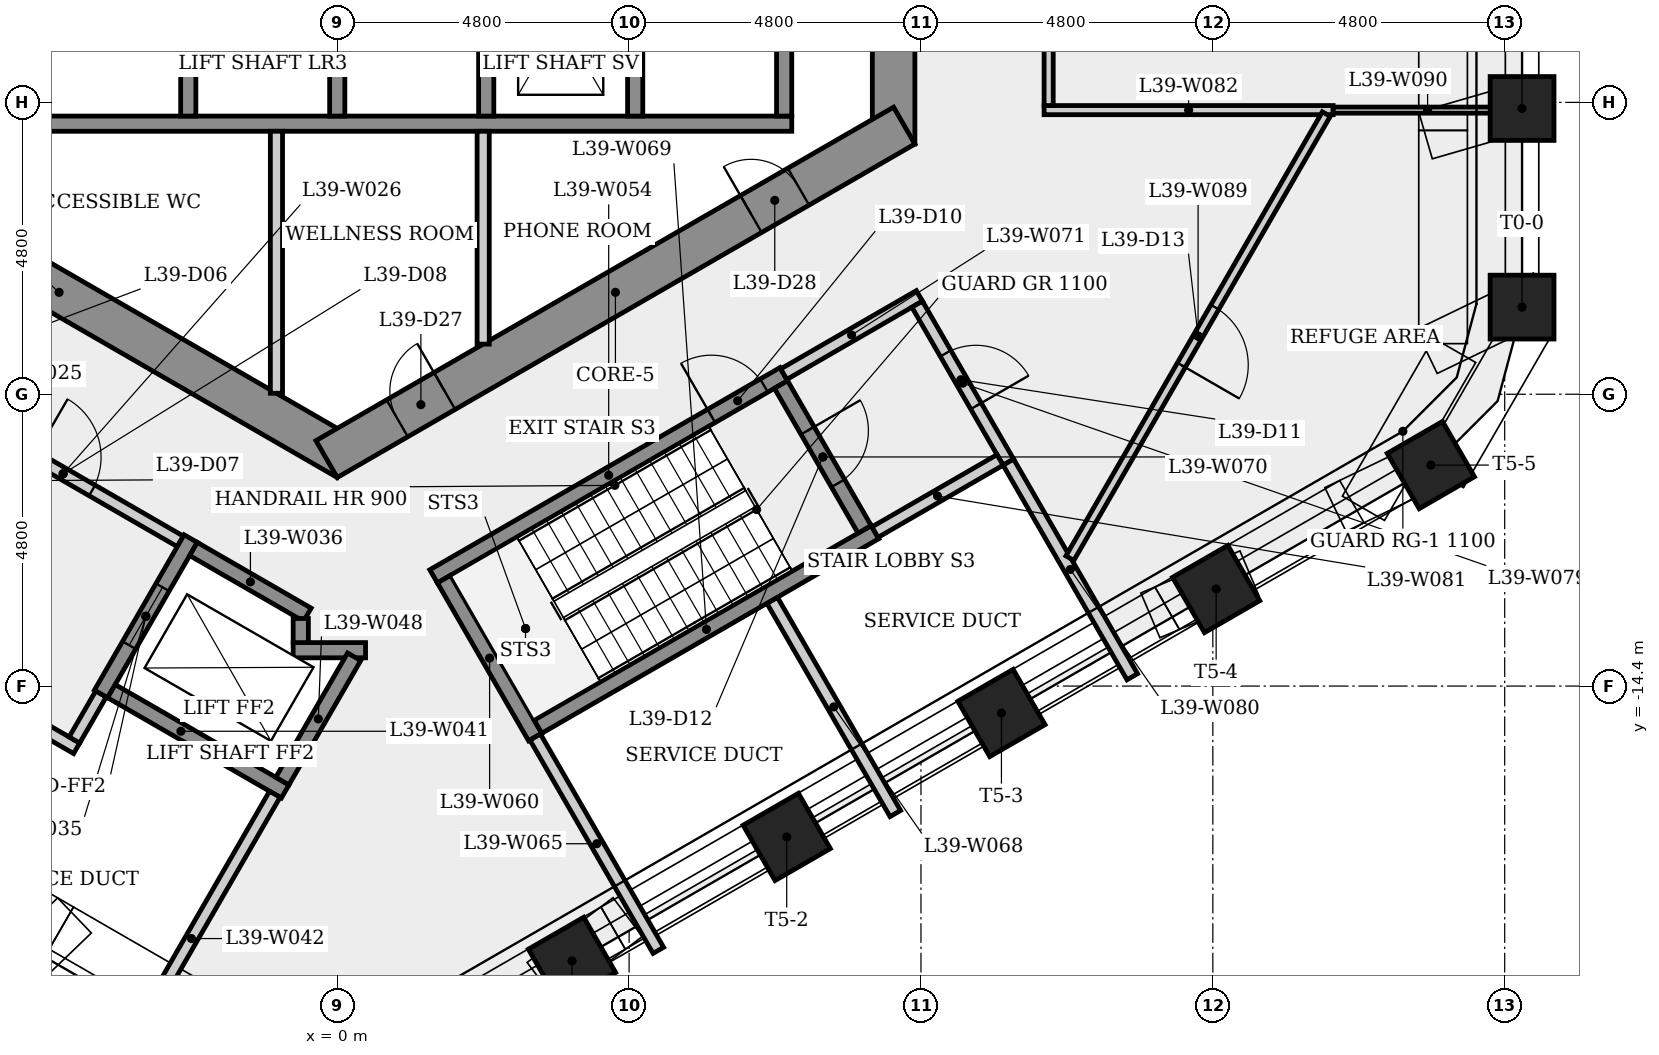
"""IFC4 building model, lengths in metres.
Left out: names, types, materials, properties, quantities, classifications, styles, units other than length and angle.
Written with IfcOpenShell. Run it as: python <this file> out.ifc"""

import sys

from ifc_helpers import new_model, si_unit, direction, frame, frame_2d, origin, origin_2d, place, context, subcontext, project, spatial, rectangle, extrude, element, fill, save


model = new_model("IFC4")
c1 = context("Model", 3, precision=1e-05, world=origin(), true_north=direction((0.0, 1.0)))
c2 = subcontext(c1, "Body", "Model", "MODEL_VIEW")
j1 = project(units=[si_unit("LENGTHUNIT", "METRE"), si_unit("PLANEANGLEUNIT", "RADIAN")], contexts=[c1])
p1 = place(None, origin())
s1 = spatial("IfcSite", under=j1, at=p1, CompositionType="ELEMENT")
p2 = place(p1, origin())
s2 = spatial("IfcBuilding", under=s1, at=p2, CompositionType="ELEMENT")
p3 = place(p2, frame((0.0, 0.0, 147.9)))
s3 = spatial("IfcBuildingStorey", under=s2, at=p3, CompositionType="ELEMENT", Elevation=147.9)
p4 = place(p3, frame((9.15, -5.485, 0.0), z_axis=(0.0, 0.0, 1.0), x_axis=(0.0, 1.0, 0.0)))
e1 = element("IfcWall", 1, at=p4, inside=s3, PredefinedType="SHEAR", context=c2, shape_type="SweptSolid", body=[
    extrude(rectangle(XDim=10.97, YDim=0.7, at=frame_2d((5.485, 0.0))), origin(), (0.0, 0.0, 1.0), 4.8),
])
p5 = place(p4, frame((4.685, 0.0, 0.0)))
e2 = element("IfcOpeningElement", 2, at=p5, cuts=e1, PredefinedType="OPENING", context=c2, shape_type="SweptSolid", body=[
    extrude(rectangle(XDim=1.6, YDim=2.1, at=frame_2d((0.8, 1.05))), frame((0.0, 0.36, 0.0), z_axis=(0.0, -1.0, 0.0), x_axis=(1.0, 0.0, 0.0)), (0.0, 0.0, 1.0), 0.72),
])
p6 = place(p3, frame((-9.325, -5.182, 0.0), z_axis=(0.0, 0.0, 1.0), x_axis=(0.866023993627, -0.500002442456, 0.0)))
e3 = element("IfcWall", 3, at=p6, inside=s3, PredefinedType="SHEAR", context=c2, shape_type="SweptSolid", body=[
    extrude(rectangle(XDim=10.97, YDim=0.7, at=frame_2d((5.485, 0.0))), origin(), (0.0, 0.0, 1.0), 4.8),
])
p7 = place(p6, frame((2.817, 0.0, 0.0)))
e4 = element("IfcOpeningElement", 4, at=p7, cuts=e3, PredefinedType="OPENING", context=c2, shape_type="SweptSolid", body=[
    extrude(rectangle(XDim=0.9, YDim=2.1, at=frame_2d((0.45, 1.05))), frame((0.0, 0.36, 0.0), z_axis=(0.0, -1.0, 0.0), x_axis=(1.0, 0.0, 0.0)), (0.0, 0.0, 1.0), 0.72),
])
p8 = place(p3, frame((-0.175, -10.667, 0.0), z_axis=(0.0, 0.0, 1.0), x_axis=(0.866023993627, 0.500002442456, 0.0)))
e5 = element("IfcWall", 5, at=p8, inside=s3, PredefinedType="SHEAR", context=c2, shape_type="SweptSolid", body=[
    extrude(rectangle(XDim=10.97, YDim=0.7, at=frame_2d((5.485, 0.0))), origin(), (0.0, 0.0, 1.0), 4.8),
])
p9 = place(p8, frame((1.34, 0.0, 0.0)))
e6 = element("IfcOpeningElement", 6, at=p9, cuts=e5, PredefinedType="OPENING", context=c2, shape_type="SweptSolid", body=[
    extrude(rectangle(XDim=0.9, YDim=2.1, at=frame_2d((0.45, 1.05))), frame((0.0, 0.36, 0.0), z_axis=(0.0, -1.0, 0.0), x_axis=(1.0, 0.0, 0.0)), (0.0, 0.0, 1.0), 0.72),
])
p10 = place(p8, frame((8.061, 0.0, 0.0)))
e7 = element("IfcOpeningElement", 7, at=p10, cuts=e5, PredefinedType="OPENING", context=c2, shape_type="SweptSolid", body=[
    extrude(rectangle(XDim=0.9, YDim=2.1, at=frame_2d((0.45, 1.05))), frame((0.0, 0.36, 0.0), z_axis=(0.0, -1.0, 0.0), x_axis=(1.0, 0.0, 0.0)), (0.0, 0.0, 1.0), 0.72),
])
for number, where, z_axis, x_axis in (
    (8, (19.486, -8.167, 0.0), (0.0, 0.0, 1.0), (1.0, 0.0, 0.0)),
    (9, (19.486, -4.9, 0.0), (0.0, 0.0, 1.0), (1.0, 0.0, 0.0)),
    (10, (3.861, -18.92, 0.0), (0.0, 0.0, 1.0), (0.5, -0.866, 0.0)),
    (11, (7.392, -16.881, 0.0), (0.0, 0.0, 1.0), (0.5, -0.866, 0.0)),
    (12, (10.923, -14.843, 0.0), (0.0, 0.0, 1.0), (0.5, -0.866, 0.0)),
    (13, (14.455, -12.804, 0.0), (0.0, 0.0, 1.0), (0.5, -0.866, 0.0)),
    (14, (17.986, -10.765, 0.0), (0.0, 0.0, 1.0), (0.5, -0.866, 0.0)),
):
    element("IfcColumn", number, at=place(p3, frame(where, z_axis=z_axis, x_axis=x_axis)), inside=s3, PredefinedType="COLUMN", context=c2, shape_type="SweptSolid", body=[
        extrude(rectangle(XDim=1.05, YDim=1.05, at=origin_2d()), origin(), (0.0, 0.0, 1.0), 4.45),
    ])
p11 = place(p3, frame((-8.356, -13.073, 0.0), z_axis=(0.0, 0.0, 1.0), x_axis=(0.866038532462, -0.499977259774, 0.0)))
e15 = element("IfcWall", 15, at=p11, inside=s3, PredefinedType="PLUMBINGWALL", context=c2, shape_type="SweptSolid", body=[
    extrude(rectangle(XDim=4.7, YDim=0.2, at=frame_2d((2.35, 0.0))), origin(), (0.0, 0.0, 1.0), 4.45),
])
p12 = place(p3, frame((-6.435, -9.795, 0.0), z_axis=(0.0, 0.0, 1.0), x_axis=(0.866012907634, -0.500021643343, 0.0)))
e16 = element("IfcWall", 16, at=p12, inside=s3, PredefinedType="PARTITIONING", context=c2, shape_type="SweptSolid", body=[
    extrude(rectangle(XDim=4.45, YDim=0.2, at=frame_2d((2.225, 0.0))), origin(), (0.0, 0.0, 1.0), 4.45),
])
p13 = place(p12, frame((1.675, 0.0, 0.0)))
e17 = element("IfcOpeningElement", 17, at=p13, cuts=e16, PredefinedType="OPENING", context=c2, shape_type="SweptSolid", body=[
    extrude(rectangle(XDim=1.1, YDim=2.1, at=frame_2d((0.55, 1.05))), frame((0.0, 0.11, 0.0), z_axis=(0.0, -1.0, 0.0), x_axis=(1.0, 0.0, 0.0)), (0.0, 0.0, 1.0), 0.22),
])
p14 = place(p3, frame((-7.225, -5.15, 0.0), z_axis=(0.0, 0.0, 1.0), x_axis=(1.0, 0.0, 0.0)))
e18 = element("IfcWall", 18, at=p14, inside=s3, PredefinedType="SHEAR", context=c2, shape_type="SweptSolid", body=[
    extrude(rectangle(XDim=14.7, YDim=0.25, at=frame_2d((7.35, 0.0))), origin(), (0.0, 0.0, 1.0), 4.45),
])
p15 = place(p3, frame((-3.885, -14.529, 0.0), z_axis=(0.0, 0.0, 1.0), x_axis=(-0.499859285417, -0.866106630146, 0.0)))
e19 = element("IfcWall", 19, at=p15, inside=s3, PredefinedType="PLUMBINGWALL", context=c2, shape_type="SweptSolid", body=[
    extrude(rectangle(XDim=0.875, YDim=0.2, at=frame_2d((0.438, 0.0))), origin(), (0.0, 0.0, 1.0), 4.45),
])
p16 = place(p3, frame((-2.41, -11.974, 0.0), z_axis=(0.0, 0.0, 1.0), x_axis=(-0.500001826776, -0.866024349092, 0.0)))
e20 = element("IfcWall", 20, at=p16, inside=s3, PredefinedType="SHEAR", context=c2, shape_type="SweptSolid", body=[
    extrude(rectangle(XDim=2.95, YDim=0.25, at=frame_2d((1.475, 0.0))), origin(), (0.0, 0.0, 1.0), 4.45),
])
p17 = place(p16, frame((0.925, 0.0, 0.0)))
e21 = element("IfcOpeningElement", 21, at=p17, cuts=e20, PredefinedType="OPENING", context=c2, shape_type="SweptSolid", body=[
    extrude(rectangle(XDim=1.1, YDim=2.1, at=frame_2d((0.55, 1.05))), frame((0.0, 0.135, 0.0), z_axis=(0.0, -1.0, 0.0), x_axis=(1.0, 0.0, 0.0)), (0.0, 0.0, 1.0), 0.27),
])
p18 = place(p3, frame((-2.364, -12.145, 0.0), z_axis=(0.0, 0.0, 1.0), x_axis=(0.86603892542, -0.499976579108, 0.0)))
e22 = element("IfcWall", 22, at=p18, inside=s3, PredefinedType="SHEAR", context=c2, shape_type="SweptSolid", body=[
    extrude(rectangle(XDim=2.162, YDim=0.25, at=frame_2d((1.081, 0.0))), origin(), (0.0, 0.0, 1.0), 4.8),
])
p19 = place(p3, frame((-2.45, -1.925, 0.0), z_axis=(0.0, 0.0, 1.0), x_axis=(0.0, -1.0, 0.0)))
e23 = element("IfcWall", 23, at=p19, inside=s3, PredefinedType="SHEAR", context=c2, shape_type="SweptSolid", body=[
    extrude(rectangle(XDim=3.1, YDim=0.25, at=frame_2d((1.55, 0.0))), origin(), (0.0, 0.0, 1.0), 4.45),
])
p20 = place(p3, frame((-1.0, -5.275, 0.0), z_axis=(0.0, 0.0, 1.0), x_axis=(0.0, -1.0, 0.0)))
e24 = element("IfcWall", 24, at=p20, inside=s3, PredefinedType="PARTITIONING", context=c2, shape_type="SweptSolid", body=[
    extrude(rectangle(XDim=4.309, YDim=0.2, at=frame_2d((2.155, 0.0))), origin(), (0.0, 0.0, 1.0), 4.45),
])
p21 = place(p3, frame((-0.856, -16.133, 0.0), z_axis=(0.0, 0.0, 1.0), x_axis=(-0.866021716278, 0.500006386895, 0.0)))
e25 = element("IfcWall", 25, at=p21, inside=s3, PredefinedType="SHEAR", context=c2, shape_type="SweptSolid", body=[
    extrude(rectangle(XDim=3.3, YDim=0.25, at=frame_2d((1.65, 0.0))), origin(), (0.0, 0.0, 1.0), 4.45),
])
p22 = place(p3, frame((-1.027, -16.179, 0.0), z_axis=(0.0, 0.0, 1.0), x_axis=(-0.499980760091, -0.866036511666, 0.0)))
e26 = element("IfcWall", 26, at=p22, inside=s3, PredefinedType="PLUMBINGWALL", context=c2, shape_type="SweptSolid", body=[
    extrude(rectangle(XDim=5.482, YDim=0.2, at=frame_2d((2.741, 0.0))), origin(), (0.0, 0.0, 1.0), 4.45),
])
p23 = place(p3, frame((-0.725, -13.81, 0.0), z_axis=(0.0, 0.0, 1.0), x_axis=(1.0, 0.0, 0.0)))
e27 = element("IfcWall", 27, at=p23, inside=s3, PredefinedType="SHEAR", context=c2, shape_type="SweptSolid", body=[
    extrude(rectangle(XDim=1.191, YDim=0.25, at=frame_2d((0.595, 0.0))), origin(), (0.0, 0.0, 1.0), 4.45),
])
p24 = place(p3, frame((-0.6, -13.289, 0.0), z_axis=(0.0, 0.0, 1.0), x_axis=(0.0, -1.0, 0.0)))
e28 = element("IfcWall", 28, at=p24, inside=s3, PredefinedType="SHEAR", context=c2, shape_type="SweptSolid", body=[
    extrude(rectangle(XDim=0.396, YDim=0.25, at=frame_2d((0.198, 0.0))), origin(), (0.0, 0.0, 1.0), 4.8),
])
p25 = place(p3, frame((0.0, -1.925, 0.0), z_axis=(0.0, 0.0, 1.0), x_axis=(0.0, -1.0, 0.0)))
e29 = element("IfcWall", 29, at=p25, inside=s3, PredefinedType="SHEAR", context=c2, shape_type="SweptSolid", body=[
    extrude(rectangle(XDim=3.1, YDim=0.25, at=frame_2d((1.55, 0.0))), origin(), (0.0, 0.0, 1.0), 4.45),
])
p26 = place(p3, frame((0.278, -13.918, 0.0), z_axis=(0.0, 0.0, 1.0), x_axis=(-0.49998806882, -0.866032292145, 0.0)))
e30 = element("IfcWall", 30, at=p26, inside=s3, PredefinedType="SHEAR", context=c2, shape_type="SweptSolid", body=[
    extrude(rectangle(XDim=2.36, YDim=0.25, at=frame_2d((1.18, 0.0))), origin(), (0.0, 0.0, 1.0), 4.8),
])
p27 = place(p3, frame((1.585, -12.595, 0.0), z_axis=(0.0, 0.0, 1.0), x_axis=(0.866036417653, 0.499980922934, 0.0)))
e31 = element("IfcWall", 31, at=p27, inside=s3, PredefinedType="SHEAR", context=c2, shape_type="SweptSolid", body=[
    extrude(rectangle(XDim=6.65, YDim=0.25, at=frame_2d((3.325, 0.0))), origin(), (0.0, 0.0, 1.0), 4.45),
])
p28 = place(p27, frame((5.275, 0.0, 0.0)))
e32 = element("IfcOpeningElement", 32, at=p28, cuts=e31, PredefinedType="OPENING", context=c2, shape_type="SweptSolid", body=[
    extrude(rectangle(XDim=1.0, YDim=2.1, at=frame_2d((0.5, 1.05))), frame((0.0, 0.135, 0.0), z_axis=(0.0, -1.0, 0.0), x_axis=(1.0, 0.0, 0.0)), (0.0, 0.0, 1.0), 0.27),
])
p29 = place(p3, frame((2.4, -5.275, 0.0), z_axis=(0.0, 0.0, 1.0), x_axis=(0.0, -1.0, 0.0)))
e33 = element("IfcWall", 33, at=p29, inside=s3, PredefinedType="PARTITIONING", context=c2, shape_type="SweptSolid", body=[
    extrude(rectangle(XDim=3.501, YDim=0.2, at=frame_2d((1.75, 0.0))), origin(), (0.0, 0.0, 1.0), 4.45),
])
p30 = place(p3, frame((2.45, -1.925, 0.0), z_axis=(0.0, 0.0, 1.0), x_axis=(0.0, -1.0, 0.0)))
e34 = element("IfcWall", 34, at=p30, inside=s3, PredefinedType="SHEAR", context=c2, shape_type="SweptSolid", body=[
    extrude(rectangle(XDim=3.1, YDim=0.25, at=frame_2d((1.55, 0.0))), origin(), (0.0, 0.0, 1.0), 4.8),
])
p31 = place(p3, frame((3.256, -15.239, 0.0), z_axis=(0.0, 0.0, 1.0), x_axis=(-0.50002537861, 0.866010750942, 0.0)))
e35 = element("IfcWall", 35, at=p31, inside=s3, PredefinedType="SHEAR", context=c2, shape_type="SweptSolid", body=[
    extrude(rectangle(XDim=3.0, YDim=0.25, at=frame_2d((1.5, 0.0))), origin(), (0.0, 0.0, 1.0), 4.45),
])
p32 = place(p3, frame((4.9, -1.925, 0.0), z_axis=(0.0, 0.0, 1.0), x_axis=(0.0, -1.0, 0.0)))
e36 = element("IfcWall", 36, at=p32, inside=s3, PredefinedType="SHEAR", context=c2, shape_type="SweptSolid", body=[
    extrude(rectangle(XDim=3.1, YDim=0.25, at=frame_2d((1.55, 0.0))), origin(), (0.0, 0.0, 1.0), 4.8),
])
for number, where, z_axis, x_axis in (
    (37, (5.281, -18.747, 0.0), (0.0, 0.0, 1.0), (-0.5, 0.866, 0.0)),
    (38, (7.153, -12.989, 0.0), (0.0, 0.0, 1.0), (0.5, -0.866, 0.0)),
):
    element("IfcWall", number, at=place(p3, frame(where, z_axis=z_axis, x_axis=x_axis)), inside=s3, PredefinedType="PLUMBINGWALL", context=c2, shape_type="SweptSolid", body=[
        extrude(rectangle(XDim=4.051, YDim=0.2, at=frame_2d((2.025, 0.0))), origin(), (0.0, 0.0, 1.0), 4.45),
    ])
p33 = place(p3, frame((3.301, -15.068, 0.0), z_axis=(0.0, 0.0, 1.0), x_axis=(0.866035036182, 0.499983315828, 0.0)))
e39 = element("IfcWall", 39, at=p33, inside=s3, PredefinedType="SHEAR", context=c2, shape_type="SweptSolid", body=[
    extrude(rectangle(XDim=6.4, YDim=0.25, at=frame_2d((3.2, 0.0))), origin(), (0.0, 0.0, 1.0), 4.45),
])
p34 = place(p3, frame((7.298, -9.441, 0.0), z_axis=(0.0, 0.0, 1.0), x_axis=(0.500034990121, -0.866005201286, 0.0)))
e40 = element("IfcWall", 40, at=p34, inside=s3, PredefinedType="SHEAR", context=c2, shape_type="SweptSolid", body=[
    extrude(rectangle(XDim=2.75, YDim=0.25, at=frame_2d((1.375, 0.0))), origin(), (0.0, 0.0, 1.0), 4.45),
])
p35 = place(p34, frame((0.875, 0.0, 0.0)))
e41 = element("IfcOpeningElement", 41, at=p35, cuts=e40, PredefinedType="OPENING", context=c2, shape_type="SweptSolid", body=[
    extrude(rectangle(XDim=1.0, YDim=2.1, at=frame_2d((0.5, 1.05))), frame((0.0, 0.135, 0.0), z_axis=(0.0, -1.0, 0.0), x_axis=(1.0, 0.0, 0.0)), (0.0, 0.0, 1.0), 0.27),
])
p36 = place(p3, frame((7.344, -9.27, 0.0), z_axis=(0.0, 0.0, 1.0), x_axis=(0.866005588531, 0.500034319456, 0.0)))
e42 = element("IfcWall", 42, at=p36, inside=s3, PredefinedType="PARTITIONING", context=c2, shape_type="SweptSolid", body=[
    extrude(rectangle(XDim=2.575, YDim=0.2, at=frame_2d((1.288, 0.0))), origin(), (0.0, 0.0, 1.0), 4.45),
])
p37 = place(p3, frame((7.35, -1.925, 0.0), z_axis=(0.0, 0.0, 1.0), x_axis=(0.0, -1.0, 0.0)))
e43 = element("IfcWall", 43, at=p37, inside=s3, PredefinedType="SHEAR", context=c2, shape_type="SweptSolid", body=[
    extrude(rectangle(XDim=3.1, YDim=0.25, at=frame_2d((1.55, 0.0))), origin(), (0.0, 0.0, 1.0), 4.8),
])
p38 = place(p3, frame((9.537, -8.119, 0.0), z_axis=(0.0, 0.0, 1.0), x_axis=(0.499990139034, -0.866031096941, 0.0)))
e44 = element("IfcWall", 44, at=p38, inside=s3, PredefinedType="PARTITIONING", context=c2, shape_type="SweptSolid", body=[
    extrude(rectangle(XDim=3.0, YDim=0.2, at=frame_2d((1.5, 0.0))), origin(), (0.0, 0.0, 1.0), 4.45),
])
p39 = place(p38, frame((0.935, 0.0, 0.0)))
e45 = element("IfcOpeningElement", 45, at=p39, cuts=e44, PredefinedType="OPENING", context=c2, shape_type="SweptSolid", body=[
    extrude(rectangle(XDim=1.0, YDim=2.1, at=frame_2d((0.5, 1.05))), frame((0.0, 0.11, 0.0), z_axis=(0.0, -1.0, 0.0), x_axis=(1.0, 0.0, 0.0)), (0.0, 0.0, 1.0), 0.22),
])
p40 = place(p3, frame((11.037, -10.717, 0.0), z_axis=(0.0, 0.0, 1.0), x_axis=(0.499992114976, -0.866029956157, 0.0)))
e46 = element("IfcWall", 46, at=p40, inside=s3, PredefinedType="PLUMBINGWALL", context=c2, shape_type="SweptSolid", body=[
    extrude(rectangle(XDim=4.075, YDim=0.2, at=frame_2d((2.038, 0.0))), origin(), (0.0, 0.0, 1.0), 4.45),
])
p41 = place(p3, frame((10.901, -10.681, 0.0), z_axis=(0.0, 0.0, 1.0), x_axis=(-0.866007538022, -0.500030943131, 0.0)))
e47 = element("IfcWall", 47, at=p41, inside=s3, PredefinedType="PLUMBINGWALL", context=c2, shape_type="SweptSolid", body=[
    extrude(rectangle(XDim=2.375, YDim=0.2, at=frame_2d((1.188, 0.0))), origin(), (0.0, 0.0, 1.0), 4.45),
])
p42 = place(p3, frame((11.625, -4.927, 0.0), z_axis=(0.0, 0.0, 1.0), x_axis=(1.0, 0.0, 0.0)))
e48 = element("IfcWall", 48, at=p42, inside=s3, PredefinedType="PARTITIONING", context=c2, shape_type="SweptSolid", body=[
    extrude(rectangle(XDim=4.754, YDim=0.15, at=frame_2d((2.377, 0.0))), origin(), (0.0, 0.0, 1.0), 4.45),
])
p43 = place(p3, frame((11.7, -4.852, 0.0), z_axis=(0.0, 0.0, 1.0), x_axis=(0.0, 1.0, 0.0)))
e49 = element("IfcWall", 49, at=p43, inside=s3, PredefinedType="PARTITIONING", context=c2, shape_type="SweptSolid", body=[
    extrude(rectangle(XDim=9.854, YDim=0.15, at=frame_2d((4.927, 0.0))), origin(), (0.0, 0.0, 1.0), 4.45),
])
p44 = place(p43, frame((2.732, 0.0, 0.0)))
e50 = element("IfcOpeningElement", 50, at=p44, cuts=e49, PredefinedType="OPENING", context=c2, shape_type="SweptSolid", body=[
    extrude(rectangle(XDim=1.0, YDim=2.1, at=frame_2d((0.5, 1.05))), frame((0.0, 0.085, 0.0), z_axis=(0.0, -1.0, 0.0), x_axis=(1.0, 0.0, 0.0)), (0.0, 0.0, 1.0), 0.17),
])
p45 = place(p3, frame((16.266, -4.992, 0.0), z_axis=(0.0, 0.0, 1.0), x_axis=(-0.499996410164, -0.866027476367, 0.0)))
e51 = element("IfcWall", 51, at=p45, inside=s3, PredefinedType="PARTITIONING", context=c2, shape_type="SweptSolid", body=[
    extrude(rectangle(XDim=8.434, YDim=0.15, at=frame_2d((4.217, 0.0))), origin(), (0.0, 0.0, 1.0), 4.45),
])
p46 = place(p45, frame((3.667, 0.0, 0.0)))
e52 = element("IfcOpeningElement", 52, at=p46, cuts=e51, PredefinedType="OPENING", context=c2, shape_type="SweptSolid", body=[
    extrude(rectangle(XDim=1.1, YDim=2.1, at=frame_2d((0.55, 1.05))), frame((0.0, 0.085, 0.0), z_axis=(0.0, -1.0, 0.0), x_axis=(1.0, 0.0, 0.0)), (0.0, 0.0, 1.0), 0.17),
])
p47 = place(p3, frame((16.379, -4.927, 0.0), z_axis=(0.0, 0.0, 1.0), x_axis=(1.0, 0.0, 0.0)))
e53 = element("IfcWall", 53, at=p47, inside=s3, PredefinedType="PARTITIONING", context=c2, shape_type="SweptSolid", body=[
    extrude(rectangle(XDim=3.107, YDim=0.1, at=frame_2d((1.553, 0.0))), origin(), (0.0, 0.0, 1.0), 4.45),
])
p48 = place(p13, origin())
e54 = element("IfcDoor", 54, at=p48, inside=s3, OperationType="SINGLE_SWING_LEFT", PredefinedType="DOOR", context=c2, shape_type="SweptSolid", body=[
    extrude(rectangle(XDim=1.1, YDim=2.1, at=frame_2d((0.55, 1.05))), frame((0.0, 0.025, 0.0), z_axis=(0.0, -1.0, 0.0), x_axis=(1.0, 0.0, 0.0)), (0.0, 0.0, 1.0), 0.05),
])
fill(e17, e54)
p49 = place(p17, origin())
e55 = element("IfcDoor", 55, at=p49, inside=s3, OperationType="SLIDING_TO_LEFT", PredefinedType="DOOR", context=c2, shape_type="SweptSolid", body=[
    extrude(rectangle(XDim=1.1, YDim=2.1, at=frame_2d((0.55, 1.05))), frame((0.0, 0.025, 0.0), z_axis=(0.0, -1.0, 0.0), x_axis=(1.0, 0.0, 0.0)), (0.0, 0.0, 1.0), 0.05),
])
fill(e21, e55)
p50 = place(p28, origin())
e56 = element("IfcDoor", 56, at=p50, inside=s3, OperationType="SINGLE_SWING_LEFT", PredefinedType="DOOR", context=c2, shape_type="SweptSolid", body=[
    extrude(rectangle(XDim=1.0, YDim=2.1, at=frame_2d((0.5, 1.05))), frame((0.0, 0.025, 0.0), z_axis=(0.0, -1.0, 0.0), x_axis=(1.0, 0.0, 0.0)), (0.0, 0.0, 1.0), 0.05),
])
fill(e32, e56)
p51 = place(p39, origin())
e57 = element("IfcDoor", 57, at=p51, inside=s3, OperationType="SINGLE_SWING_RIGHT", PredefinedType="DOOR", context=c2, shape_type="SweptSolid", body=[
    extrude(rectangle(XDim=1.0, YDim=2.1, at=frame_2d((0.5, 1.05))), frame((0.0, 0.025, 0.0), z_axis=(0.0, -1.0, 0.0), x_axis=(1.0, 0.0, 0.0)), (0.0, 0.0, 1.0), 0.05),
])
fill(e45, e57)
p52 = place(p35, origin())
e58 = element("IfcDoor", 58, at=p52, inside=s3, OperationType="SINGLE_SWING_LEFT", PredefinedType="DOOR", context=c2, shape_type="SweptSolid", body=[
    extrude(rectangle(XDim=1.0, YDim=2.1, at=frame_2d((0.5, 1.05))), frame((0.0, 0.025, 0.0), z_axis=(0.0, -1.0, 0.0), x_axis=(1.0, 0.0, 0.0)), (0.0, 0.0, 1.0), 0.05),
])
fill(e41, e58)
p53 = place(p46, origin())
e59 = element("IfcDoor", 59, at=p53, inside=s3, OperationType="SINGLE_SWING_RIGHT", PredefinedType="DOOR", context=c2, shape_type="SweptSolid", body=[
    extrude(rectangle(XDim=1.1, YDim=2.1, at=frame_2d((0.55, 1.05))), frame((0.0, 0.025, 0.0), z_axis=(0.0, -1.0, 0.0), x_axis=(1.0, 0.0, 0.0)), (0.0, 0.0, 1.0), 0.05),
])
fill(e52, e59)
p54 = place(p9, origin())
e60 = element("IfcDoor", 60, at=p54, inside=s3, OperationType="SINGLE_SWING_RIGHT", PredefinedType="DOOR", context=c2, shape_type="SweptSolid", body=[
    extrude(rectangle(XDim=0.9, YDim=2.1, at=frame_2d((0.45, 1.05))), frame((0.0, 0.025, 0.0), z_axis=(0.0, -1.0, 0.0), x_axis=(1.0, 0.0, 0.0)), (0.0, 0.0, 1.0), 0.05),
])
fill(e6, e60)
p55 = place(p10, origin())
e61 = element("IfcDoor", 61, at=p55, inside=s3, OperationType="SINGLE_SWING_LEFT", PredefinedType="DOOR", context=c2, shape_type="SweptSolid", body=[
    extrude(rectangle(XDim=0.9, YDim=2.1, at=frame_2d((0.45, 1.05))), frame((0.0, 0.025, 0.0), z_axis=(0.0, -1.0, 0.0), x_axis=(1.0, 0.0, 0.0)), (0.0, 0.0, 1.0), 0.05),
])
fill(e7, e61)
save(model, sys.argv[1])
